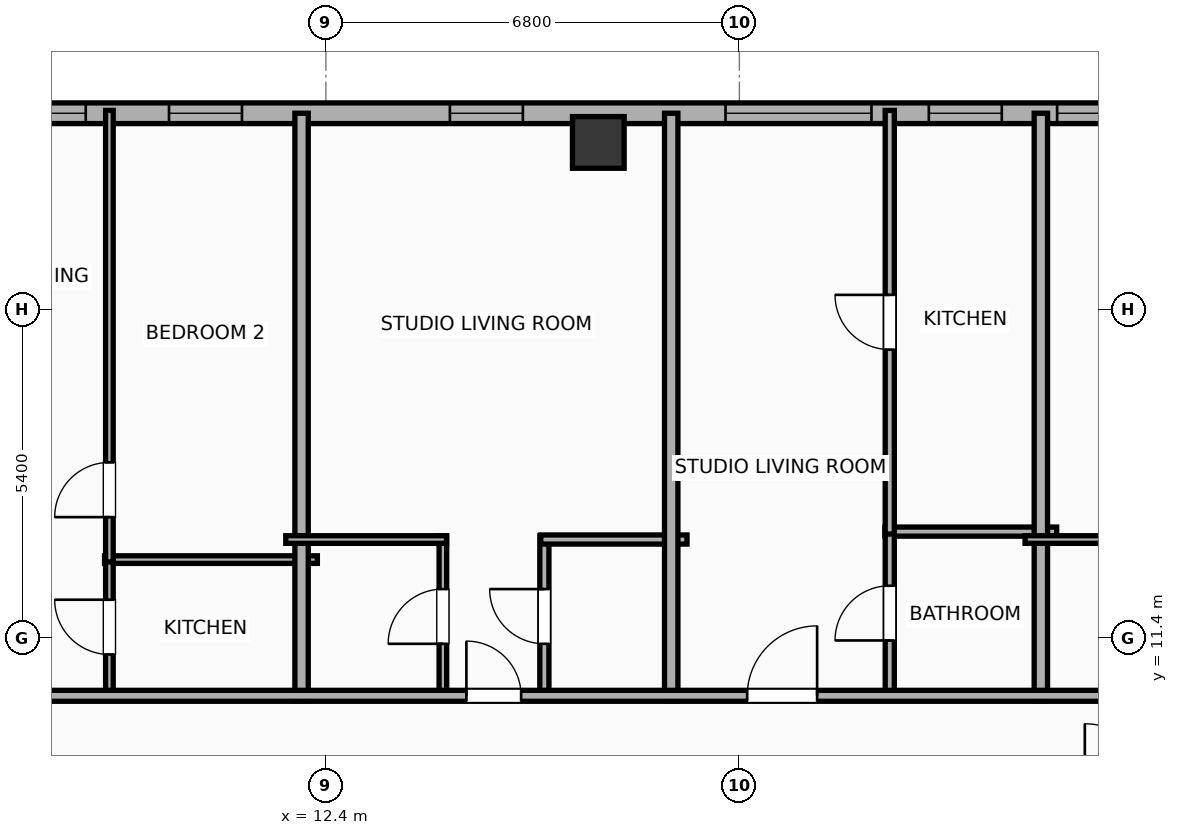
"""IFC4 building model, lengths in metres.
Left out: names, types, materials, properties, quantities, classifications, styles, units other than length and angle.
Written with IfcOpenShell. Run it as: python <this file> out.ifc"""

import sys

from ifc_helpers import new_model, si_unit, direction, frame, frame_2d, origin, origin_2d, place, context, subcontext, project, spatial, rectangle, hollow_rectangle, extrude, element, fill, save


model = new_model("IFC4")
c1 = context("Model", 3, precision=1e-05, world=origin(), true_north=direction((0.0, 1.0)))
c2 = subcontext(c1, "Body", "Model", "MODEL_VIEW")
j1 = project(units=[si_unit("LENGTHUNIT", "METRE"), si_unit("PLANEANGLEUNIT", "RADIAN")], contexts=[c1])
p1 = place(None, origin())
s1 = spatial("IfcSite", under=j1, at=p1, CompositionType="ELEMENT")
p2 = place(p1, origin())
s2 = spatial("IfcBuilding", under=s1, at=p2, CompositionType="ELEMENT")
p3 = place(p2, frame((0.0, 0.0, 250.9)))
s3 = spatial("IfcBuildingStorey", under=s2, at=p3, CompositionType="ELEMENT", Elevation=250.9)
p4 = place(p3, frame((16.88, 19.55, 0.0), z_axis=(0.0, 0.0, 1.0), x_axis=(1.0, 0.0, 0.0)))
e1 = element("IfcColumn", 1, at=p4, inside=s3, PredefinedType="COLUMN", context=c2, shape_type="SweptSolid", body=[
    extrude(hollow_rectangle(XDim=0.85, YDim=0.85, WallThickness=0.028, at=origin_2d()), origin(), (0.0, 0.0, 1.0), 3.865),
])
p5 = place(p3, frame((-22.783, 20.03, 0.0), z_axis=(0.0, 0.0, 1.0), x_axis=(1.0, 0.0, 0.0)))
e2 = element("IfcWall", 2, at=p5, inside=s3, PredefinedType="ELEMENTEDWALL", context=c2, shape_type="SweptSolid", body=[
    extrude(rectangle(XDim=49.566, YDim=0.34, at=frame_2d((24.783, 0.0))), origin(), (0.0, 0.0, 1.0), 2.39),
])
p6 = place(p5, frame((25.233, 0.0, 0.75)))
e3 = element("IfcOpeningElement", 3, at=p6, cuts=e2, PredefinedType="OPENING", context=c2, shape_type="SweptSolid", body=[
    extrude(rectangle(XDim=2.4, YDim=1.45, at=frame_2d((1.2, 0.725))), frame((0.0, 0.18, 0.0), z_axis=(0.0, -1.0, 0.0), x_axis=(1.0, 0.0, 0.0)), (0.0, 0.0, 1.0), 0.36),
])
p7 = place(p5, frame((41.756, 0.0, 0.75)))
e4 = element("IfcOpeningElement", 4, at=p7, cuts=e2, PredefinedType="OPENING", context=c2, shape_type="SweptSolid", body=[
    extrude(rectangle(XDim=2.4, YDim=1.45, at=frame_2d((1.2, 0.725))), frame((0.0, 0.18, 0.0), z_axis=(0.0, -1.0, 0.0), x_axis=(1.0, 0.0, 0.0)), (0.0, 0.0, 1.0), 0.36),
])
p8 = place(p5, frame((1.637, 0.0, 0.55)))
e5 = element("IfcOpeningElement", 5, at=p8, cuts=e2, PredefinedType="OPENING", context=c2, shape_type="SweptSolid", body=[
    extrude(rectangle(XDim=1.2, YDim=1.15, at=frame_2d((0.6, 0.575))), frame((0.0, 0.18, 0.0), z_axis=(0.0, -1.0, 0.0), x_axis=(1.0, 0.0, 0.0)), (0.0, 0.0, 1.0), 0.36),
])
p9 = place(p5, frame((8.019, 0.0, 0.55)))
e6 = element("IfcOpeningElement", 6, at=p9, cuts=e2, PredefinedType="OPENING", context=c2, shape_type="SweptSolid", body=[
    extrude(rectangle(XDim=1.2, YDim=1.15, at=frame_2d((0.6, 0.575))), frame((0.0, 0.18, 0.0), z_axis=(0.0, -1.0, 0.0), x_axis=(1.0, 0.0, 0.0)), (0.0, 0.0, 1.0), 0.36),
])
p10 = place(p5, frame((4.524, 0.0, 0.55)))
e7 = element("IfcOpeningElement", 7, at=p10, cuts=e2, PredefinedType="OPENING", context=c2, shape_type="SweptSolid", body=[
    extrude(rectangle(XDim=1.2, YDim=1.15, at=frame_2d((0.6, 0.575))), frame((0.0, 0.18, 0.0), z_axis=(0.0, -1.0, 0.0), x_axis=(1.0, 0.0, 0.0)), (0.0, 0.0, 1.0), 0.36),
])
p11 = place(p5, frame((11.678, 0.0, 0.55)))
e8 = element("IfcOpeningElement", 8, at=p11, cuts=e2, PredefinedType="OPENING", context=c2, shape_type="SweptSolid", body=[
    extrude(rectangle(XDim=1.2, YDim=1.15, at=frame_2d((0.6, 0.575))), frame((0.0, 0.18, 0.0), z_axis=(0.0, -1.0, 0.0), x_axis=(1.0, 0.0, 0.0)), (0.0, 0.0, 1.0), 0.36),
])
p12 = place(p5, frame((17.993, 0.0, 0.55)))
e9 = element("IfcOpeningElement", 9, at=p12, cuts=e2, PredefinedType="OPENING", context=c2, shape_type="SweptSolid", body=[
    extrude(rectangle(XDim=1.2, YDim=1.15, at=frame_2d((0.6, 0.575))), frame((0.0, 0.18, 0.0), z_axis=(0.0, -1.0, 0.0), x_axis=(1.0, 0.0, 0.0)), (0.0, 0.0, 1.0), 0.36),
])
p13 = place(p5, frame((15.138, 0.0, 0.55)))
e10 = element("IfcOpeningElement", 10, at=p13, cuts=e2, PredefinedType="OPENING", context=c2, shape_type="SweptSolid", body=[
    extrude(rectangle(XDim=1.2, YDim=1.15, at=frame_2d((0.6, 0.575))), frame((0.0, 0.18, 0.0), z_axis=(0.0, -1.0, 0.0), x_axis=(1.0, 0.0, 0.0)), (0.0, 0.0, 1.0), 0.36),
])
p14 = place(p5, frame((22.278, 0.0, 0.55)))
e11 = element("IfcOpeningElement", 11, at=p14, cuts=e2, PredefinedType="OPENING", context=c2, shape_type="SweptSolid", body=[
    extrude(rectangle(XDim=1.2, YDim=1.15, at=frame_2d((0.6, 0.575))), frame((0.0, 0.18, 0.0), z_axis=(0.0, -1.0, 0.0), x_axis=(1.0, 0.0, 0.0)), (0.0, 0.0, 1.0), 0.36),
])
p15 = place(p5, frame((30.384, 0.0, 0.55)))
e12 = element("IfcOpeningElement", 12, at=p15, cuts=e2, PredefinedType="OPENING", context=c2, shape_type="SweptSolid", body=[
    extrude(rectangle(XDim=0.85, YDim=1.15, at=frame_2d((0.425, 0.575))), frame((0.0, 0.18, 0.0), z_axis=(0.0, -1.0, 0.0), x_axis=(1.0, 0.0, 0.0)), (0.0, 0.0, 1.0), 0.36),
])
p16 = place(p5, frame((32.603, 0.0, 0.55)))
e13 = element("IfcOpeningElement", 13, at=p16, cuts=e2, PredefinedType="OPENING", context=c2, shape_type="SweptSolid", body=[
    extrude(rectangle(XDim=1.2, YDim=1.15, at=frame_2d((0.6, 0.575))), frame((0.0, 0.18, 0.0), z_axis=(0.0, -1.0, 0.0), x_axis=(1.0, 0.0, 0.0)), (0.0, 0.0, 1.0), 0.36),
])
p17 = place(p5, frame((37.223, 0.0, 0.55)))
e14 = element("IfcOpeningElement", 14, at=p17, cuts=e2, PredefinedType="OPENING", context=c2, shape_type="SweptSolid", body=[
    extrude(rectangle(XDim=1.2, YDim=1.15, at=frame_2d((0.6, 0.575))), frame((0.0, 0.18, 0.0), z_axis=(0.0, -1.0, 0.0), x_axis=(1.0, 0.0, 0.0)), (0.0, 0.0, 1.0), 0.36),
])
p18 = place(p5, frame((45.099, 0.0, 0.55)))
e15 = element("IfcOpeningElement", 15, at=p18, cuts=e2, PredefinedType="OPENING", context=c2, shape_type="SweptSolid", body=[
    extrude(rectangle(XDim=1.2, YDim=1.15, at=frame_2d((0.6, 0.575))), frame((0.0, 0.18, 0.0), z_axis=(0.0, -1.0, 0.0), x_axis=(1.0, 0.0, 0.0)), (0.0, 0.0, 1.0), 0.36),
])
p19 = place(p5, frame((47.209, 0.0, 0.55)))
e16 = element("IfcOpeningElement", 16, at=p19, cuts=e2, PredefinedType="OPENING", context=c2, shape_type="SweptSolid", body=[
    extrude(rectangle(XDim=1.2, YDim=1.15, at=frame_2d((0.6, 0.575))), frame((0.0, 0.18, 0.0), z_axis=(0.0, -1.0, 0.0), x_axis=(1.0, 0.0, 0.0)), (0.0, 0.0, 1.0), 0.36),
])
p20 = place(p3, frame((8.76, 12.69, 0.0), z_axis=(0.0, 0.0, 1.0), x_axis=(1.0, 0.0, 0.0)))
e17 = element("IfcWall", 17, at=p20, inside=s3, PredefinedType="PARTITIONING", context=c2, shape_type="SweptSolid", body=[
    extrude(rectangle(XDim=3.5, YDim=0.125, at=frame_2d((1.75, 0.0))), origin(), (0.0, 0.0, 1.0), 3.5),
])
p21 = place(p3, frame((8.84, 10.43, 0.0), z_axis=(0.0, 0.0, 1.0), x_axis=(0.0, 1.0, 0.0)))
e18 = element("IfcWall", 18, at=p21, inside=s3, PredefinedType="PARTITIONING", context=c2, shape_type="SweptSolid", body=[
    extrude(rectangle(XDim=2.3, YDim=0.125, at=frame_2d((1.15, 0.0))), origin(), (0.0, 0.0, 1.0), 3.5),
])
p22 = place(p21, frame((0.7, 0.0, 0.0)))
e19 = element("IfcOpeningElement", 19, at=p22, cuts=e18, PredefinedType="OPENING", context=c2, shape_type="SweptSolid", body=[
    extrude(rectangle(XDim=0.9, YDim=2.05, at=frame_2d((0.45, 1.025))), frame((0.0, 0.073, 0.0), z_axis=(0.0, -1.0, 0.0), x_axis=(1.0, 0.0, 0.0)), (0.0, 0.0, 1.0), 0.145),
])
p23 = place(p3, frame((8.84, 12.65, 0.0), z_axis=(0.0, 0.0, 1.0), x_axis=(0.0, 1.0, 0.0)))
e20 = element("IfcWall", 20, at=p23, inside=s3, PredefinedType="PARTITIONING", context=c2, shape_type="SweptSolid", body=[
    extrude(rectangle(XDim=7.427, YDim=0.125, at=frame_2d((3.713, 0.0))), origin(), (0.0, 0.0, 1.0), 3.5),
])
p24 = place(p23, frame((0.738, 0.0, 0.0)))
e21 = element("IfcOpeningElement", 21, at=p24, cuts=e20, PredefinedType="OPENING", context=c2, shape_type="SweptSolid", body=[
    extrude(rectangle(XDim=0.9, YDim=2.05, at=frame_2d((0.45, 1.025))), frame((0.0, 0.073, 0.0), z_axis=(0.0, -1.0, 0.0), x_axis=(1.0, 0.0, 0.0)), (0.0, 0.0, 1.0), 0.145),
])
p25 = place(p3, frame((12.0, 10.37, 0.0), z_axis=(0.0, 0.0, 1.0), x_axis=(0.0, 1.0, 0.0)))
e22 = element("IfcWall", 22, at=p25, inside=s3, PredefinedType="PARTITIONING", context=c2, shape_type="SweptSolid", body=[
    extrude(rectangle(XDim=9.66, YDim=0.22, at=frame_2d((4.83, 0.0))), origin(), (0.0, 0.0, 1.0), 3.5),
])
p26 = place(p3, frame((14.324, 10.43, 0.0), z_axis=(0.0, 0.0, 1.0), x_axis=(0.0, 1.0, 0.0)))
e23 = element("IfcWall", 23, at=p26, inside=s3, PredefinedType="PARTITIONING", context=c2, shape_type="SweptSolid", body=[
    extrude(rectangle(XDim=2.65, YDim=0.125, at=frame_2d((1.325, 0.0))), origin(), (0.0, 0.0, 1.0), 3.5),
])
p27 = place(p26, frame((0.875, 0.0, 0.0)))
e24 = element("IfcOpeningElement", 24, at=p27, cuts=e23, PredefinedType="OPENING", context=c2, shape_type="SweptSolid", body=[
    extrude(rectangle(XDim=0.9, YDim=2.05, at=frame_2d((0.45, 1.025))), frame((0.0, 0.073, 0.0), z_axis=(0.0, -1.0, 0.0), x_axis=(1.0, 0.0, 0.0)), (0.0, 0.0, 1.0), 0.145),
])
p28 = place(p3, frame((15.993, 10.43, 0.0), z_axis=(0.0, 0.0, 1.0), x_axis=(0.0, 1.0, 0.0)))
e25 = element("IfcWall", 25, at=p28, inside=s3, PredefinedType="PLUMBINGWALL", context=c2, shape_type="SweptSolid", body=[
    extrude(rectangle(XDim=2.65, YDim=0.15, at=frame_2d((1.325, 0.0))), origin(), (0.0, 0.0, 1.0), 2.39),
])
p29 = place(p28, frame((0.875, 0.0, 0.0)))
e26 = element("IfcOpeningElement", 26, at=p29, cuts=e25, PredefinedType="OPENING", context=c2, shape_type="SweptSolid", body=[
    extrude(rectangle(XDim=0.9, YDim=2.05, at=frame_2d((0.45, 1.025))), frame((0.0, 0.085, 0.0), z_axis=(0.0, -1.0, 0.0), x_axis=(1.0, 0.0, 0.0)), (0.0, 0.0, 1.0), 0.17),
])
p30 = place(p3, frame((11.74, 13.02, 0.0), z_axis=(0.0, 0.0, 1.0), x_axis=(1.0, 0.0, 0.0)))
e27 = element("IfcWall", 27, at=p30, inside=s3, PredefinedType="PARTITIONING", context=c2, shape_type="SweptSolid", body=[
    extrude(rectangle(XDim=2.644, YDim=0.125, at=frame_2d((1.322, 0.0))), origin(), (0.0, 0.0, 1.0), 3.5),
])
p31 = place(p3, frame((15.933, 13.02, 0.0), z_axis=(0.0, 0.0, 1.0), x_axis=(1.0, 0.0, 0.0)))
e28 = element("IfcWall", 28, at=p31, inside=s3, PredefinedType="PLUMBINGWALL", context=c2, shape_type="SweptSolid", body=[
    extrude(rectangle(XDim=2.406, YDim=0.15, at=frame_2d((1.203, 0.0))), origin(), (0.0, 0.0, 1.0), 3.5),
])
p32 = place(p3, frame((18.079, 10.37, 0.0), z_axis=(0.0, 0.0, 1.0), x_axis=(0.0, 1.0, 0.0)))
e29 = element("IfcWall", 29, at=p32, inside=s3, PredefinedType="PARTITIONING", context=c2, shape_type="SweptSolid", body=[
    extrude(rectangle(XDim=9.66, YDim=0.22, at=frame_2d((4.83, 0.0))), origin(), (0.0, 0.0, 1.0), 3.5),
])
p33 = place(p3, frame((21.593, 13.15, 0.0), z_axis=(0.0, 0.0, 1.0), x_axis=(1.0, 0.0, 0.0)))
e30 = element("IfcWall", 30, at=p33, inside=s3, PredefinedType="PLUMBINGWALL", context=c2, shape_type="SweptSolid", body=[
    extrude(rectangle(XDim=2.825, YDim=0.15, at=frame_2d((1.413, 0.0))), origin(), (0.0, 0.0, 1.0), 3.5),
])
p34 = place(p3, frame((21.673, 10.43, 0.0), z_axis=(0.0, 0.0, 1.0), x_axis=(0.0, 1.0, 0.0)))
e31 = element("IfcWall", 31, at=p34, inside=s3, PredefinedType="PLUMBINGWALL", context=c2, shape_type="SweptSolid", body=[
    extrude(rectangle(XDim=2.76, YDim=0.15, at=frame_2d((1.38, 0.0))), origin(), (0.0, 0.0, 1.0), 2.39),
])
p35 = place(p34, frame((0.93, 0.0, 0.0)))
e32 = element("IfcOpeningElement", 32, at=p35, cuts=e31, PredefinedType="OPENING", context=c2, shape_type="SweptSolid", body=[
    extrude(rectangle(XDim=0.9, YDim=2.05, at=frame_2d((0.45, 1.025))), frame((0.0, 0.085, 0.0), z_axis=(0.0, -1.0, 0.0), x_axis=(1.0, 0.0, 0.0)), (0.0, 0.0, 1.0), 0.17),
])
p36 = place(p3, frame((21.673, 13.11, 0.0), z_axis=(0.0, 0.0, 1.0), x_axis=(0.0, 1.0, 0.0)))
e33 = element("IfcWall", 33, at=p36, inside=s3, PredefinedType="PLUMBINGWALL", context=c2, shape_type="SweptSolid", body=[
    extrude(rectangle(XDim=6.967, YDim=0.15, at=frame_2d((3.483, 0.0))), origin(), (0.0, 0.0, 1.0), 2.39),
])
p37 = place(p36, frame((3.033, 0.0, 0.0)))
e34 = element("IfcOpeningElement", 34, at=p37, cuts=e33, PredefinedType="OPENING", context=c2, shape_type="SweptSolid", body=[
    extrude(rectangle(XDim=0.9, YDim=2.05, at=frame_2d((0.45, 1.025))), frame((0.0, 0.085, 0.0), z_axis=(0.0, -1.0, 0.0), x_axis=(1.0, 0.0, 0.0)), (0.0, 0.0, 1.0), 0.17),
])
p38 = place(p3, frame((24.158, 10.37, 0.0), z_axis=(0.0, 0.0, 1.0), x_axis=(0.0, 1.0, 0.0)))
e35 = element("IfcWall", 35, at=p38, inside=s3, PredefinedType="PARTITIONING", context=c2, shape_type="SweptSolid", body=[
    extrude(rectangle(XDim=9.66, YDim=0.22, at=frame_2d((4.83, 0.0))), origin(), (0.0, 0.0, 1.0), 2.39),
])
p39 = place(p3, frame((23.898, 13.02, 0.0), z_axis=(0.0, 0.0, 1.0), x_axis=(1.0, 0.0, 0.0)))
e36 = element("IfcWall", 36, at=p39, inside=s3, PredefinedType="PARTITIONING", context=c2, shape_type="SweptSolid", body=[
    extrude(rectangle(XDim=2.667, YDim=0.125, at=frame_2d((1.333, 0.0))), origin(), (0.0, 0.0, 1.0), 3.5),
])
p40 = place(p3, frame((-26.23, 10.45, 0.0), z_axis=(0.0, 0.0, 1.0), x_axis=(1.0, 0.0, 0.0)))
e37 = element("IfcWall", 37, at=p40, inside=s3, PredefinedType="PARTITIONING", context=c2, shape_type="SweptSolid", body=[
    extrude(rectangle(XDim=56.46, YDim=0.18, at=frame_2d((28.23, 0.0))), origin(), (0.0, 0.0, 1.0), 3.5),
])
p41 = place(p40, frame((3.072, 0.0, 0.0)))
e38 = element("IfcOpeningElement", 38, at=p41, cuts=e37, PredefinedType="OPENING", context=c2, shape_type="SweptSolid", body=[
    extrude(rectangle(XDim=1.15, YDim=2.05, at=frame_2d((0.575, 1.025))), frame((0.0, 0.1, 0.0), z_axis=(0.0, -1.0, 0.0), x_axis=(1.0, 0.0, 0.0)), (0.0, 0.0, 1.0), 0.2),
])
p42 = place(p40, frame((12.146, 0.0, 0.0)))
e39 = element("IfcOpeningElement", 39, at=p42, cuts=e37, PredefinedType="OPENING", context=c2, shape_type="SweptSolid", body=[
    extrude(rectangle(XDim=1.15, YDim=2.05, at=frame_2d((0.575, 1.025))), frame((0.0, 0.1, 0.0), z_axis=(0.0, -1.0, 0.0), x_axis=(1.0, 0.0, 0.0)), (0.0, 0.0, 1.0), 0.2),
])
p43 = place(p40, frame((22.302, 0.0, 0.0)))
e40 = element("IfcOpeningElement", 40, at=p43, cuts=e37, PredefinedType="OPENING", context=c2, shape_type="SweptSolid", body=[
    extrude(rectangle(XDim=1.15, YDim=2.05, at=frame_2d((0.575, 1.025))), frame((0.0, 0.1, 0.0), z_axis=(0.0, -1.0, 0.0), x_axis=(1.0, 0.0, 0.0)), (0.0, 0.0, 1.0), 0.2),
])
p44 = place(p40, frame((32.601, 0.0, 0.0)))
e41 = element("IfcOpeningElement", 41, at=p44, cuts=e37, PredefinedType="OPENING", context=c2, shape_type="SweptSolid", body=[
    extrude(rectangle(XDim=1.15, YDim=2.05, at=frame_2d((0.575, 1.025))), frame((0.0, 0.1, 0.0), z_axis=(0.0, -1.0, 0.0), x_axis=(1.0, 0.0, 0.0)), (0.0, 0.0, 1.0), 0.2),
])
p45 = place(p40, frame((40.941, 0.0, 0.0)))
e42 = element("IfcOpeningElement", 42, at=p45, cuts=e37, PredefinedType="OPENING", context=c2, shape_type="SweptSolid", body=[
    extrude(rectangle(XDim=0.9, YDim=2.05, at=frame_2d((0.45, 1.025))), frame((0.0, 0.1, 0.0), z_axis=(0.0, -1.0, 0.0), x_axis=(1.0, 0.0, 0.0)), (0.0, 0.0, 1.0), 0.2),
])
p46 = place(p40, frame((45.559, 0.0, 0.0)))
e43 = element("IfcOpeningElement", 43, at=p46, cuts=e37, PredefinedType="OPENING", context=c2, shape_type="SweptSolid", body=[
    extrude(rectangle(XDim=1.15, YDim=2.05, at=frame_2d((0.575, 1.025))), frame((0.0, 0.1, 0.0), z_axis=(0.0, -1.0, 0.0), x_axis=(1.0, 0.0, 0.0)), (0.0, 0.0, 1.0), 0.2),
])
p47 = place(p40, frame((53.125, 0.0, 0.0)))
e44 = element("IfcOpeningElement", 44, at=p47, cuts=e37, PredefinedType="OPENING", context=c2, shape_type="SweptSolid", body=[
    extrude(rectangle(XDim=0.9, YDim=2.05, at=frame_2d((0.45, 1.025))), frame((0.0, 0.1, 0.0), z_axis=(0.0, -1.0, 0.0), x_axis=(1.0, 0.0, 0.0)), (0.0, 0.0, 1.0), 0.2),
])
p48 = place(p7, origin())
e45 = element("IfcWindow", 45, at=p48, inside=s3, PartitioningType="SINGLE_PANEL", PredefinedType="WINDOW", context=c2, shape_type="SweptSolid", body=[
    extrude(rectangle(XDim=2.4, YDim=1.45, at=frame_2d((1.2, 0.725))), frame((0.0, 0.03, 0.0), z_axis=(0.0, -1.0, 0.0), x_axis=(1.0, 0.0, 0.0)), (0.0, 0.0, 1.0), 0.06),
])
fill(e4, e45)
p49 = place(p15, origin())
e46 = element("IfcWindow", 46, at=p49, inside=s3, PartitioningType="SINGLE_PANEL", PredefinedType="WINDOW", context=c2, shape_type="SweptSolid", body=[
    extrude(rectangle(XDim=0.85, YDim=1.15, at=frame_2d((0.425, 0.575))), frame((0.0, 0.03, 0.0), z_axis=(0.0, -1.0, 0.0), x_axis=(1.0, 0.0, 0.0)), (0.0, 0.0, 1.0), 0.06),
])
fill(e12, e46)
p50 = place(p16, origin())
e47 = element("IfcWindow", 47, at=p50, inside=s3, PartitioningType="SINGLE_PANEL", PredefinedType="WINDOW", context=c2, shape_type="SweptSolid", body=[
    extrude(rectangle(XDim=1.2, YDim=1.15, at=frame_2d((0.6, 0.575))), frame((0.0, 0.03, 0.0), z_axis=(0.0, -1.0, 0.0), x_axis=(1.0, 0.0, 0.0)), (0.0, 0.0, 1.0), 0.06),
])
fill(e13, e47)
p51 = place(p17, origin())
e48 = element("IfcWindow", 48, at=p51, inside=s3, PartitioningType="SINGLE_PANEL", PredefinedType="WINDOW", context=c2, shape_type="SweptSolid", body=[
    extrude(rectangle(XDim=1.2, YDim=1.15, at=frame_2d((0.6, 0.575))), frame((0.0, 0.03, 0.0), z_axis=(0.0, -1.0, 0.0), x_axis=(1.0, 0.0, 0.0)), (0.0, 0.0, 1.0), 0.06),
])
fill(e14, e48)
p52 = place(p18, origin())
e49 = element("IfcWindow", 49, at=p52, inside=s3, PartitioningType="SINGLE_PANEL", PredefinedType="WINDOW", context=c2, shape_type="SweptSolid", body=[
    extrude(rectangle(XDim=1.2, YDim=1.15, at=frame_2d((0.6, 0.575))), frame((0.0, 0.03, 0.0), z_axis=(0.0, -1.0, 0.0), x_axis=(1.0, 0.0, 0.0)), (0.0, 0.0, 1.0), 0.06),
])
fill(e15, e49)
p53 = place(p19, origin())
e50 = element("IfcWindow", 50, at=p53, inside=s3, PartitioningType="SINGLE_PANEL", PredefinedType="WINDOW", context=c2, shape_type="SweptSolid", body=[
    extrude(rectangle(XDim=1.2, YDim=1.15, at=frame_2d((0.6, 0.575))), frame((0.0, 0.03, 0.0), z_axis=(0.0, -1.0, 0.0), x_axis=(1.0, 0.0, 0.0)), (0.0, 0.0, 1.0), 0.06),
])
fill(e16, e50)
p54 = place(p22, origin())
e51 = element("IfcDoor", 51, at=p54, inside=s3, OperationType="SINGLE_SWING_RIGHT", PredefinedType="DOOR", context=c2, shape_type="SweptSolid", body=[
    extrude(rectangle(XDim=0.9, YDim=2.05, at=frame_2d((0.45, 1.025))), frame((0.0, 0.025, 0.0), z_axis=(0.0, -1.0, 0.0), x_axis=(1.0, 0.0, 0.0)), (0.0, 0.0, 1.0), 0.05),
])
fill(e19, e51)
p55 = place(p24, origin())
e52 = element("IfcDoor", 52, at=p55, inside=s3, OperationType="SINGLE_SWING_LEFT", PredefinedType="DOOR", context=c2, shape_type="SweptSolid", body=[
    extrude(rectangle(XDim=0.9, YDim=2.05, at=frame_2d((0.45, 1.025))), frame((0.0, 0.025, 0.0), z_axis=(0.0, -1.0, 0.0), x_axis=(1.0, 0.0, 0.0)), (0.0, 0.0, 1.0), 0.05),
])
fill(e21, e52)
p56 = place(p27, origin())
e53 = element("IfcDoor", 53, at=p56, inside=s3, OperationType="SINGLE_SWING_LEFT", PredefinedType="DOOR", context=c2, shape_type="SweptSolid", body=[
    extrude(rectangle(XDim=0.9, YDim=2.05, at=frame_2d((0.45, 1.025))), frame((0.0, 0.025, 0.0), z_axis=(0.0, -1.0, 0.0), x_axis=(1.0, 0.0, 0.0)), (0.0, 0.0, 1.0), 0.05),
])
fill(e24, e53)
p57 = place(p29, origin())
e54 = element("IfcDoor", 54, at=p57, inside=s3, OperationType="SINGLE_SWING_RIGHT", PredefinedType="DOOR", context=c2, shape_type="SweptSolid", body=[
    extrude(rectangle(XDim=0.9, YDim=2.05, at=frame_2d((0.45, 1.025))), frame((0.0, 0.025, 0.0), z_axis=(0.0, -1.0, 0.0), x_axis=(1.0, 0.0, 0.0)), (0.0, 0.0, 1.0), 0.05),
])
fill(e26, e54)
p58 = place(p35, origin())
e55 = element("IfcDoor", 55, at=p58, inside=s3, OperationType="SINGLE_SWING_LEFT", PredefinedType="DOOR", context=c2, shape_type="SweptSolid", body=[
    extrude(rectangle(XDim=0.9, YDim=2.05, at=frame_2d((0.45, 1.025))), frame((0.0, 0.025, 0.0), z_axis=(0.0, -1.0, 0.0), x_axis=(1.0, 0.0, 0.0)), (0.0, 0.0, 1.0), 0.05),
])
fill(e32, e55)
p59 = place(p37, origin())
e56 = element("IfcDoor", 56, at=p59, inside=s3, OperationType="SINGLE_SWING_RIGHT", PredefinedType="DOOR", context=c2, shape_type="SweptSolid", body=[
    extrude(rectangle(XDim=0.9, YDim=2.05, at=frame_2d((0.45, 1.025))), frame((0.0, 0.025, 0.0), z_axis=(0.0, -1.0, 0.0), x_axis=(1.0, 0.0, 0.0)), (0.0, 0.0, 1.0), 0.05),
])
fill(e34, e56)
p60 = place(p45, origin())
e57 = element("IfcDoor", 57, at=p60, inside=s3, OperationType="SINGLE_SWING_LEFT", PredefinedType="DOOR", context=c2, shape_type="SweptSolid", body=[
    extrude(rectangle(XDim=0.9, YDim=2.05, at=frame_2d((0.45, 1.025))), frame((0.0, 0.025, 0.0), z_axis=(0.0, -1.0, 0.0), x_axis=(1.0, 0.0, 0.0)), (0.0, 0.0, 1.0), 0.05),
])
fill(e42, e57)
p61 = place(p46, origin())
e58 = element("IfcDoor", 58, at=p61, inside=s3, OperationType="SINGLE_SWING_RIGHT", PredefinedType="DOOR", context=c2, shape_type="SweptSolid", body=[
    extrude(rectangle(XDim=1.15, YDim=2.05, at=frame_2d((0.575, 1.025))), frame((0.0, 0.025, 0.0), z_axis=(0.0, -1.0, 0.0), x_axis=(1.0, 0.0, 0.0)), (0.0, 0.0, 1.0), 0.05),
])
fill(e43, e58)
save(model, sys.argv[1])
